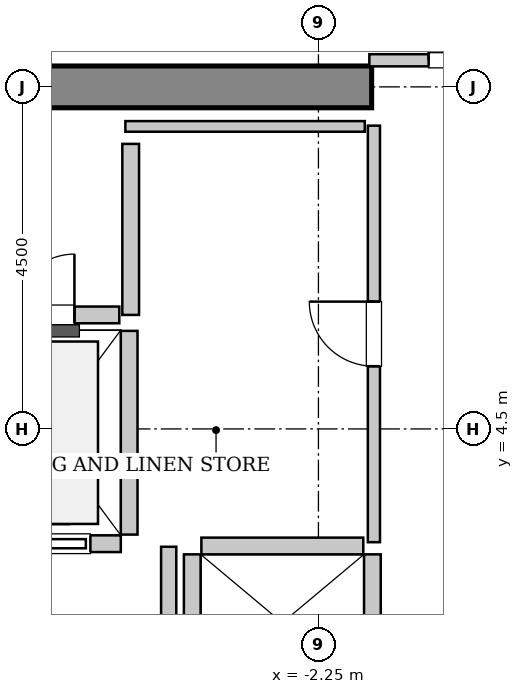
"""IFC4 building model, lengths in metres.
Left out: names, types, materials, properties, quantities, classifications, styles, units other than length and angle.
Written with IfcOpenShell. Run it as: python <this file> out.ifc"""

import sys

from ifc_helpers import new_model, si_unit, direction, frame, frame_2d, origin, place, context, subcontext, project, spatial, rectangle, extrude, source, transform, mapped, element, fill, save


model = new_model("IFC4")
c1 = context("Model", 3, precision=1e-05, world=origin(), true_north=direction((0.0, 1.0)))
c2 = subcontext(c1, "Body", "Model", "MODEL_VIEW")
j1 = project(units=[si_unit("LENGTHUNIT", "METRE"), si_unit("PLANEANGLEUNIT", "RADIAN")], contexts=[c1])
p1 = place(None, origin())
s1 = spatial("IfcSite", under=j1, at=p1, CompositionType="ELEMENT")
p2 = place(p1, origin())
s2 = spatial("IfcBuilding", under=s1, at=p2, CompositionType="ELEMENT")
p3 = place(p2, frame((0.0, 0.0, 194.4)))
s3 = spatial("IfcBuildingStorey", under=s2, at=p3, CompositionType="ELEMENT", Elevation=194.4)
m1 = source(origin(), c2, "Body", "SweptSolid", [
    extrude(rectangle(XDim=9.975, YDim=0.55, at=frame_2d((4.987, 0.0))), origin(), (0.0, 0.0, 1.0), 3.8),
])
p4 = place(p3, frame((-11.525, 9.0, 0.0), z_axis=(0.0, 0.0, 1.0), x_axis=(1.0, 0.0, 0.0)))
e1 = element("IfcWall", 1, at=p4, inside=s3, PredefinedType="SHEAR", context=c2, shape_type="MappedRepresentation", body=[
    mapped(m1, transform((0.0, 0.0, 0.0), x_axis=(1.0, 0.0, 0.0), y_axis=(0.0, 1.0, 0.0), z_axis=(0.0, 0.0, 1.0), scale=1.0)),
])
m2 = source(origin(), c2, "Body", "SweptSolid", [
    extrude(rectangle(XDim=2.0, YDim=0.22, at=frame_2d((1.0, 0.0))), origin(), (0.0, 0.0, 1.0), 3.535),
])
p5 = place(p3, frame((-6.85, 2.99, 0.0), z_axis=(0.0, 0.0, 1.0), x_axis=(1.0, 0.0, 0.0)))
e2 = element("IfcWall", 2, at=p5, inside=s3, PredefinedType="SOLIDWALL", context=c2, shape_type="MappedRepresentation", body=[
    mapped(m2, transform((0.0, 0.0, 0.0), x_axis=(1.0, 0.0, 0.0), y_axis=(0.0, 1.0, 0.0), z_axis=(0.0, 0.0, 1.0), scale=1.0)),
])
p6 = place(p5, frame((0.4, 0.0, 0.0)))
e3 = element("IfcOpeningElement", 3, at=p6, cuts=e2, PredefinedType="OPENING", context=c2, shape_type="SweptSolid", body=[
    extrude(rectangle(XDim=1.2, YDim=2.2, at=frame_2d((0.6, 1.1))), frame((0.0, 0.12, 0.0), z_axis=(0.0, -1.0, 0.0), x_axis=(1.0, 0.0, 0.0)), (0.0, 0.0, 1.0), 0.24),
])
m3 = source(origin(), c2, "Body", "SweptSolid", [
    extrude(rectangle(XDim=2.68, YDim=0.22, at=frame_2d((1.34, 0.0))), origin(), (0.0, 0.0, 1.0), 3.535),
])
p7 = place(p3, frame((-4.74, 3.11, 0.0), z_axis=(0.0, 0.0, 1.0), x_axis=(0.0, 1.0, 0.0)))
e4 = element("IfcWall", 4, at=p7, inside=s3, PredefinedType="SOLIDWALL", context=c2, shape_type="MappedRepresentation", body=[
    mapped(m3, transform((0.0, 0.0, 0.0), x_axis=(1.0, 0.0, 0.0), y_axis=(0.0, 1.0, 0.0), z_axis=(0.0, 0.0, 1.0), scale=1.0)),
])
m4 = source(origin(), c2, "Body", "SweptSolid", [
    extrude(rectangle(XDim=5.7, YDim=0.22, at=frame_2d((2.85, 0.0))), origin(), (0.0, 0.0, 1.0), 3.535),
])
for number, where, z_axis, x_axis in (
    (5, (-1.54, -2.85, 0.0), (0.0, 0.0, 1.0), (0.0, 1.0, 0.0)),
    (6, (-3.91, 2.85, 0.0), (0.0, 0.0, 1.0), (0.0, -1.0, 0.0)),
):
    element("IfcWall", number, at=place(p3, frame(where, z_axis=z_axis, x_axis=x_axis)), inside=s3, PredefinedType="SOLIDWALL", context=c2, shape_type="MappedRepresentation", body=[
        mapped(m4, transform((0.0, 0.0, 0.0), x_axis=(1.0, 0.0, 0.0), y_axis=(0.0, 1.0, 0.0), z_axis=(0.0, 0.0, 1.0), scale=1.0)),
    ])
m5 = source(origin(), c2, "Body", "SweptSolid", [
    extrude(rectangle(XDim=2.13, YDim=0.22, at=frame_2d((1.065, 0.0))), origin(), (0.0, 0.0, 1.0), 3.535),
])
p8 = place(p3, frame((-1.66, 2.96, 0.0), z_axis=(0.0, 0.0, 1.0), x_axis=(-1.0, 0.0, 0.0)))
e7 = element("IfcWall", 7, at=p8, inside=s3, PredefinedType="SOLIDWALL", context=c2, shape_type="MappedRepresentation", body=[
    mapped(m5, transform((0.0, 0.0, 0.0), x_axis=(1.0, 0.0, 0.0), y_axis=(0.0, 1.0, 0.0), z_axis=(0.0, 0.0, 1.0), scale=1.0)),
])
m6 = source(origin(), c2, "Body", "SweptSolid", [
    extrude(rectangle(XDim=2.25, YDim=0.22, at=frame_2d((1.125, 0.0))), origin(), (0.0, 0.0, 1.0), 3.535),
])
p9 = place(p3, frame((-4.72, 6.0, 0.0), z_axis=(0.0, 0.0, 1.0), x_axis=(0.0, 1.0, 0.0)))
e8 = element("IfcWall", 8, at=p9, inside=s3, PredefinedType="SOLIDWALL", context=c2, shape_type="MappedRepresentation", body=[
    mapped(m6, transform((0.0, 0.0, 0.0), x_axis=(1.0, 0.0, 0.0), y_axis=(0.0, 1.0, 0.0), z_axis=(0.0, 0.0, 1.0), scale=1.0)),
])
m7 = source(origin(), c2, "Body", "SweptSolid", [
    extrude(rectangle(XDim=1.98, YDim=0.22, at=frame_2d((0.99, 0.0))), origin(), (0.0, 0.0, 1.0), 3.535),
])
p10 = place(p3, frame((-6.85, 6.0, 0.0), z_axis=(0.0, 0.0, 1.0), x_axis=(1.0, 0.0, 0.0)))
e9 = element("IfcWall", 9, at=p10, inside=s3, PredefinedType="SOLIDWALL", context=c2, shape_type="MappedRepresentation", body=[
    mapped(m7, transform((0.0, 0.0, 0.0), x_axis=(1.0, 0.0, 0.0), y_axis=(0.0, 1.0, 0.0), z_axis=(0.0, 0.0, 1.0), scale=1.0)),
])
p11 = place(p10, frame((0.59, 0.0, 0.0)))
e10 = element("IfcOpeningElement", 10, at=p11, cuts=e9, PredefinedType="OPENING", context=c2, shape_type="SweptSolid", body=[
    extrude(rectangle(XDim=0.8, YDim=2.0, at=frame_2d((0.4, 1.0))), frame((0.0, 0.12, 0.0), z_axis=(0.0, -1.0, 0.0), x_axis=(1.0, 0.0, 0.0)), (0.0, 0.0, 1.0), 0.24),
])
m8 = source(origin(), c2, "Body", "SweptSolid", [
    extrude(rectangle(XDim=5.9, YDim=0.2, at=frame_2d((2.95, 0.0))), origin(), (0.0, 0.0, 1.0), 3.535),
])
p12 = place(p3, frame((-4.22, -2.95, 0.0), z_axis=(0.0, 0.0, 1.0), x_axis=(0.0, 1.0, 0.0)))
e11 = element("IfcWall", 11, at=p12, inside=s3, PredefinedType="PARTITIONING", context=c2, shape_type="MappedRepresentation", body=[
    mapped(m8, transform((0.0, 0.0, 0.0), x_axis=(1.0, 0.0, 0.0), y_axis=(0.0, 1.0, 0.0), z_axis=(0.0, 0.0, 1.0), scale=1.0)),
])
m9 = source(origin(), c2, "Body", "SweptSolid", [
    extrude(rectangle(XDim=3.16, YDim=0.16, at=frame_2d((1.58, 0.0))), origin(), (0.0, 0.0, 1.0), 2.425),
])
p13 = place(p3, frame((-1.58, 9.35, 0.0), z_axis=(0.0, 0.0, 1.0), x_axis=(1.0, 0.0, 0.0)))
e12 = element("IfcWall", 12, at=p13, inside=s3, PredefinedType="PARTITIONING", context=c2, shape_type="MappedRepresentation", body=[
    mapped(m9, transform((0.0, 0.0, 0.0), x_axis=(1.0, 0.0, 0.0), y_axis=(0.0, 1.0, 0.0), z_axis=(0.0, 0.0, 1.0), scale=1.0)),
])
p14 = place(p13, frame((0.78, 0.0, 0.0)))
e13 = element("IfcOpeningElement", 13, at=p14, cuts=e12, PredefinedType="OPENING", context=c2, shape_type="SweptSolid", body=[
    extrude(rectangle(XDim=1.6, YDim=2.3, at=frame_2d((0.8, 1.15))), frame((0.0, 0.09, 0.0), z_axis=(0.0, -1.0, 0.0), x_axis=(1.0, 0.0, 0.0)), (0.0, 0.0, 1.0), 0.18),
])
m10 = source(origin(), c2, "Body", "SweptSolid", [
    extrude(rectangle(XDim=5.48, YDim=0.16, at=frame_2d((2.74, 0.0))), origin(), (0.0, 0.0, 1.0), 3.535),
])
p15 = place(p3, frame((-1.52, 3.01, 0.0), z_axis=(0.0, 0.0, 1.0), x_axis=(0.0, 1.0, 0.0)))
e14 = element("IfcWall", 14, at=p15, inside=s3, PredefinedType="PARTITIONING", context=c2, shape_type="MappedRepresentation", body=[
    mapped(m10, transform((0.0, 0.0, 0.0), x_axis=(1.0, 0.0, 0.0), y_axis=(0.0, 1.0, 0.0), z_axis=(0.0, 0.0, 1.0), scale=1.0)),
])
p16 = place(p15, frame((2.315, 0.0, 0.0)))
e15 = element("IfcOpeningElement", 15, at=p16, cuts=e14, PredefinedType="OPENING", context=c2, shape_type="SweptSolid", body=[
    extrude(rectangle(XDim=0.85, YDim=2.1, at=frame_2d((0.425, 1.05))), frame((0.0, 0.09, 0.0), z_axis=(0.0, -1.0, 0.0), x_axis=(1.0, 0.0, 0.0)), (0.0, 0.0, 1.0), 0.18),
])
m11 = source(origin(), c2, "Body", "SweptSolid", [
    extrude(rectangle(XDim=3.15, YDim=0.14, at=frame_2d((1.575, 0.0))), origin(), (0.0, 0.0, 1.0), 3.535),
])
p17 = place(p3, frame((-4.79, 8.48, 0.0), z_axis=(0.0, 0.0, 1.0), x_axis=(1.0, 0.0, 0.0)))
e16 = element("IfcWall", 16, at=p17, inside=s3, PredefinedType="PARTITIONING", context=c2, shape_type="MappedRepresentation", body=[
    mapped(m11, transform((0.0, 0.0, 0.0), x_axis=(1.0, 0.0, 0.0), y_axis=(0.0, 1.0, 0.0), z_axis=(0.0, 0.0, 1.0), scale=1.0)),
])
m12 = source(origin(), c2, "Body", "SweptSolid", [
    extrude(rectangle(XDim=1.2, YDim=2.2, at=frame_2d((0.6, 1.1))), frame((0.0, 0.025, 0.0), z_axis=(0.0, -1.0, 0.0), x_axis=(1.0, 0.0, 0.0)), (0.0, 0.0, 1.0), 0.05),
])
p18 = place(p6, origin())
e17 = element("IfcDoor", 17, at=p18, inside=s3, OperationType="SLIDING_TO_LEFT", PredefinedType="DOOR", context=c2, shape_type="MappedRepresentation", body=[
    mapped(m12, transform((0.0, 0.0, 0.0), x_axis=(1.0, 0.0, 0.0), y_axis=(0.0, 1.0, 0.0), z_axis=(0.0, 0.0, 1.0), scale=1.0)),
])
fill(e3, e17)
m13 = source(origin(), c2, "Body", "SweptSolid", [
    extrude(rectangle(XDim=0.8, YDim=2.0, at=frame_2d((0.4, 1.0))), frame((0.0, 0.025, 0.0), z_axis=(0.0, -1.0, 0.0), x_axis=(1.0, 0.0, 0.0)), (0.0, 0.0, 1.0), 0.05),
])
p19 = place(p11, origin())
e18 = element("IfcDoor", 18, at=p19, inside=s3, OperationType="SINGLE_SWING_RIGHT", PredefinedType="TRAPDOOR", context=c2, shape_type="MappedRepresentation", body=[
    mapped(m13, transform((0.0, 0.0, 0.0), x_axis=(1.0, 0.0, 0.0), y_axis=(0.0, 1.0, 0.0), z_axis=(0.0, 0.0, 1.0), scale=1.0)),
])
fill(e10, e18)
m14 = source(origin(), c2, "Body", "SweptSolid", [
    extrude(rectangle(XDim=1.6, YDim=2.3, at=frame_2d((0.8, 1.15))), frame((0.0, 0.025, 0.0), z_axis=(0.0, -1.0, 0.0), x_axis=(1.0, 0.0, 0.0)), (0.0, 0.0, 1.0), 0.05),
])
p20 = place(p14, origin())
e19 = element("IfcDoor", 19, at=p20, inside=s3, OperationType="DOUBLE_DOOR_SINGLE_SWING", PredefinedType="DOOR", context=c2, shape_type="MappedRepresentation", body=[
    mapped(m14, transform((0.0, 0.0, 0.0), x_axis=(1.0, 0.0, 0.0), y_axis=(0.0, 1.0, 0.0), z_axis=(0.0, 0.0, 1.0), scale=1.0)),
])
fill(e13, e19)
m15 = source(origin(), c2, "Body", "SweptSolid", [
    extrude(rectangle(XDim=0.85, YDim=2.1, at=frame_2d((0.425, 1.05))), frame((0.0, 0.025, 0.0), z_axis=(0.0, -1.0, 0.0), x_axis=(1.0, 0.0, 0.0)), (0.0, 0.0, 1.0), 0.05),
])
p21 = place(p16, origin())
e20 = element("IfcDoor", 20, at=p21, inside=s3, OperationType="SINGLE_SWING_RIGHT", PredefinedType="DOOR", context=c2, shape_type="MappedRepresentation", body=[
    mapped(m15, transform((0.0, 0.0, 0.0), x_axis=(1.0, 0.0, 0.0), y_axis=(0.0, 1.0, 0.0), z_axis=(0.0, 0.0, 1.0), scale=1.0)),
])
fill(e15, e20)
save(model, sys.argv[1])
